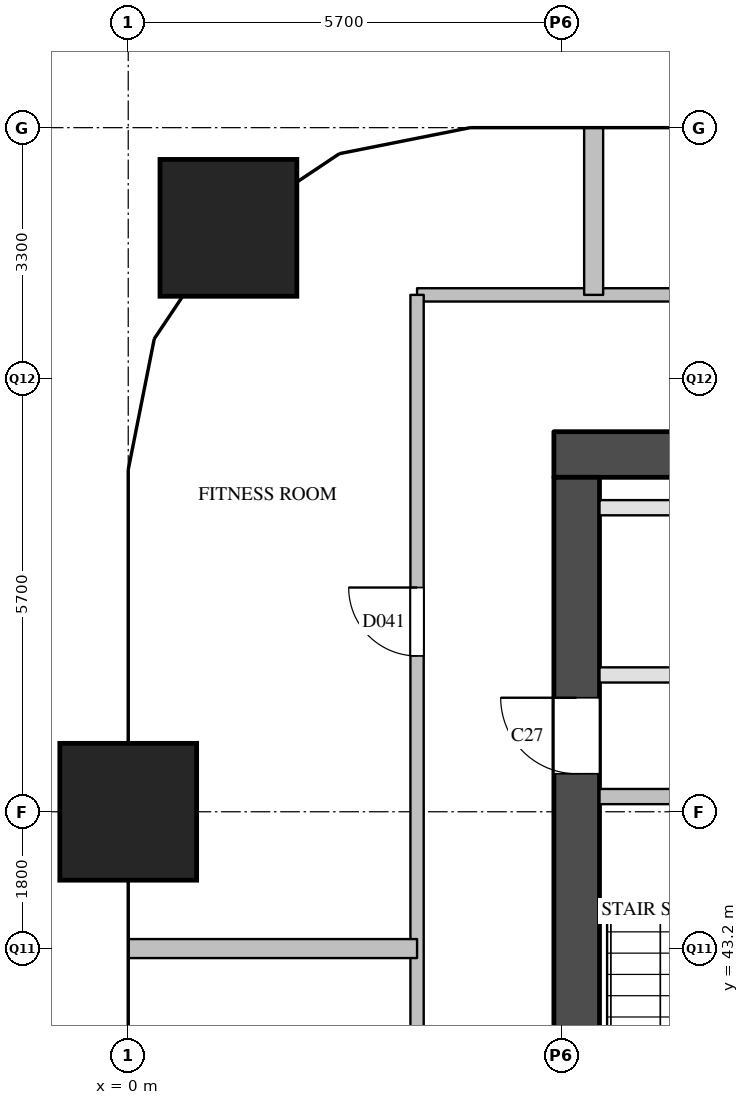
"""IFC4 building model, lengths in metres.
Left out: names, types, materials, properties, quantities, classifications, styles, units other than length and angle.
Written with IfcOpenShell. Run it as: python <this file> out.ifc"""

import sys

from ifc_helpers import new_model, si_unit, direction, frame, frame_2d, origin, origin_2d, place, context, subcontext, project, spatial, rectangle, extrude, element, fill, save


model = new_model("IFC4")
c1 = context("Model", 3, precision=1e-05, world=origin(), true_north=direction((0.0, 1.0)))
c2 = subcontext(c1, "Body", "Model", "MODEL_VIEW")
j1 = project(units=[si_unit("LENGTHUNIT", "METRE"), si_unit("PLANEANGLEUNIT", "RADIAN")], contexts=[c1])
p1 = place(None, origin())
s1 = spatial("IfcSite", under=j1, at=p1, CompositionType="ELEMENT")
p2 = place(p1, origin())
s2 = spatial("IfcBuilding", under=s1, at=p2, CompositionType="ELEMENT")
p3 = place(p2, frame((0.0, 0.0, 57.6)))
s3 = spatial("IfcBuildingStorey", under=s2, at=p3, CompositionType="ELEMENT", Elevation=57.6)
for number, where, z_axis, x_axis in (
    (1, (0.0, 45.0, 0.0), (0.0, 0.0, 1.0), (1.0, 0.0, 0.0)),
    (2, (1.318, 52.682, 0.0), (0.0, 0.0, 1.0), (1.0, 0.0, 0.0)),
):
    element("IfcColumn", number, at=place(p3, frame(where, z_axis=z_axis, x_axis=x_axis)), inside=s3, PredefinedType="COLUMN", context=c2, shape_type="SweptSolid", body=[
        extrude(rectangle(XDim=1.8, YDim=1.8, at=origin_2d()), origin(), (0.0, 0.0, 1.0), 3.8),
    ])
p4 = place(p3, frame((5.6, 49.7, 0.0), z_axis=(0.0, 0.0, 1.0), x_axis=(1.0, 0.0, 0.0)))
e3 = element("IfcWall", 3, at=p4, inside=s3, PredefinedType="SHEAR", context=c2, shape_type="SweptSolid", body=[
    extrude(rectangle(XDim=12.4, YDim=0.6, at=frame_2d((6.2, 0.0))), origin(), (0.0, 0.0, 1.0), 3.5),
])
p5 = place(p3, frame((5.9, 29.1, 0.0), z_axis=(0.0, 0.0, 1.0), x_axis=(0.0, 1.0, 0.0)))
e4 = element("IfcWall", 4, at=p5, inside=s3, PredefinedType="SHEAR", context=c2, shape_type="SweptSolid", body=[
    extrude(rectangle(XDim=20.3, YDim=0.6, at=frame_2d((10.15, 0.0))), origin(), (0.0, 0.0, 1.0), 3.5),
])
p6 = place(p5, frame((3.6, 0.0, 0.0)))
e5 = element("IfcOpeningElement", 5, at=p6, cuts=e4, PredefinedType="OPENING", context=c2, shape_type="SweptSolid", body=[
    extrude(rectangle(XDim=1.8, YDim=2.1, at=frame_2d((0.9, 1.05))), frame((0.0, 0.31, 0.0), z_axis=(0.0, -1.0, 0.0), x_axis=(1.0, 0.0, 0.0)), (0.0, 0.0, 1.0), 0.62),
])
p7 = place(p5, frame((16.4, 0.0, 0.0)))
e6 = element("IfcOpeningElement", 6, at=p7, cuts=e4, PredefinedType="OPENING", context=c2, shape_type="SweptSolid", body=[
    extrude(rectangle(XDim=1.0, YDim=2.1, at=frame_2d((0.5, 1.05))), frame((0.0, 0.31, 0.0), z_axis=(0.0, -1.0, 0.0), x_axis=(1.0, 0.0, 0.0)), (0.0, 0.0, 1.0), 0.62),
])
p8 = place(p3, frame((6.2, 45.2, 0.0), z_axis=(0.0, 0.0, 1.0), x_axis=(1.0, 0.0, 0.0)))
e7 = element("IfcWall", 7, at=p8, inside=s3, PredefinedType="SOLIDWALL", context=c2, shape_type="SweptSolid", body=[
    extrude(rectangle(XDim=6.3, YDim=0.2, at=frame_2d((3.15, 0.0))), origin(), (0.0, 0.0, 1.0), 3.5),
])
p9 = place(p8, frame((1.025, 0.0, 0.0)))
e8 = element("IfcOpeningElement", 8, at=p9, cuts=e7, PredefinedType="OPENING", context=c2, shape_type="SweptSolid", body=[
    extrude(rectangle(XDim=1.1, YDim=2.1, at=frame_2d((0.55, 1.05))), frame((0.0, 0.11, 0.0), z_axis=(0.0, -1.0, 0.0), x_axis=(1.0, 0.0, 0.0)), (0.0, 0.0, 1.0), 0.22),
])
p10 = place(p8, frame((4.175, 0.0, 0.0)))
e9 = element("IfcOpeningElement", 9, at=p10, cuts=e7, PredefinedType="OPENING", context=c2, shape_type="SweptSolid", body=[
    extrude(rectangle(XDim=1.1, YDim=2.1, at=frame_2d((0.55, 1.05))), frame((0.0, 0.11, 0.0), z_axis=(0.0, -1.0, 0.0), x_axis=(1.0, 0.0, 0.0)), (0.0, 0.0, 1.0), 0.22),
])
p11 = place(p3, frame((6.2, 46.8, 0.0), z_axis=(0.0, 0.0, 1.0), x_axis=(1.0, 0.0, 0.0)))
e10 = element("IfcWall", 10, at=p11, inside=s3, PredefinedType="PARTITIONING", context=c2, shape_type="SweptSolid", body=[
    extrude(rectangle(XDim=11.2, YDim=0.2, at=frame_2d((5.6, 0.0))), origin(), (0.0, 0.0, 1.0), 3.5),
])
p12 = place(p11, frame((5.15, 0.0, 0.0)))
e11 = element("IfcOpeningElement", 11, at=p12, cuts=e10, PredefinedType="OPENING", context=c2, shape_type="SweptSolid", body=[
    extrude(rectangle(XDim=0.9, YDim=2.1, at=frame_2d((0.45, 1.05))), frame((0.0, 0.11, 0.0), z_axis=(0.0, -1.0, 0.0), x_axis=(1.0, 0.0, 0.0)), (0.0, 0.0, 1.0), 0.22),
])
p13 = place(p3, frame((6.2, 49.0, 0.0), z_axis=(0.0, 0.0, 1.0), x_axis=(1.0, 0.0, 0.0)))
e12 = element("IfcWall", 12, at=p13, inside=s3, PredefinedType="PARTITIONING", context=c2, shape_type="SweptSolid", body=[
    extrude(rectangle(XDim=11.2, YDim=0.2, at=frame_2d((5.6, 0.0))), origin(), (0.0, 0.0, 1.0), 3.5),
])
p14 = place(p3, frame((3.8, 51.8, 0.0), z_axis=(0.0, 0.0, 1.0), x_axis=(1.0, 0.0, 0.0)))
e13 = element("IfcWall", 13, at=p14, inside=s3, PredefinedType="PARTITIONING", context=c2, shape_type="SweptSolid", body=[
    extrude(rectangle(XDim=16.0, YDim=0.175, at=frame_2d((8.0, 0.0))), origin(), (0.0, 0.0, 1.0), 3.5),
])
p15 = place(p14, frame((7.811, 0.0, 0.0)))
e14 = element("IfcOpeningElement", 14, at=p15, cuts=e13, PredefinedType="OPENING", context=c2, shape_type="SweptSolid", body=[
    extrude(rectangle(XDim=0.9, YDim=2.1, at=frame_2d((0.45, 1.05))), frame((0.0, 0.097, 0.0), z_axis=(0.0, -1.0, 0.0), x_axis=(1.0, 0.0, 0.0)), (0.0, 0.0, 1.0), 0.195),
])
p16 = place(p3, frame((3.8, 26.7, 0.0), z_axis=(0.0, 0.0, 1.0), x_axis=(0.0, 1.0, 0.0)))
e15 = element("IfcWall", 15, at=p16, inside=s3, PredefinedType="PARTITIONING", context=c2, shape_type="SweptSolid", body=[
    extrude(rectangle(XDim=25.1, YDim=0.175, at=frame_2d((12.55, 0.0))), origin(), (0.0, 0.0, 1.0), 2.5),
])
p17 = place(p16, frame((2.4, 0.0, 0.0)))
e16 = element("IfcOpeningElement", 16, at=p17, cuts=e15, PredefinedType="OPENING", context=c2, shape_type="SweptSolid", body=[
    extrude(rectangle(XDim=0.9, YDim=2.1, at=frame_2d((0.45, 1.05))), frame((0.0, 0.097, 0.0), z_axis=(0.0, -1.0, 0.0), x_axis=(1.0, 0.0, 0.0)), (0.0, 0.0, 1.0), 0.195),
])
p18 = place(p16, frame((7.05, 0.0, 0.0)))
e17 = element("IfcOpeningElement", 17, at=p18, cuts=e15, PredefinedType="OPENING", context=c2, shape_type="SweptSolid", body=[
    extrude(rectangle(XDim=0.9, YDim=2.1, at=frame_2d((0.45, 1.05))), frame((0.0, 0.097, 0.0), z_axis=(0.0, -1.0, 0.0), x_axis=(1.0, 0.0, 0.0)), (0.0, 0.0, 1.0), 0.195),
])
p19 = place(p16, frame((12.45, 0.0, 0.0)))
e18 = element("IfcOpeningElement", 18, at=p19, cuts=e15, PredefinedType="OPENING", context=c2, shape_type="SweptSolid", body=[
    extrude(rectangle(XDim=0.9, YDim=2.1, at=frame_2d((0.45, 1.05))), frame((0.0, 0.097, 0.0), z_axis=(0.0, -1.0, 0.0), x_axis=(1.0, 0.0, 0.0)), (0.0, 0.0, 1.0), 0.195),
])
p20 = place(p16, frame((20.35, 0.0, 0.0)))
e19 = element("IfcOpeningElement", 19, at=p20, cuts=e15, PredefinedType="OPENING", context=c2, shape_type="SweptSolid", body=[
    extrude(rectangle(XDim=0.9, YDim=2.1, at=frame_2d((0.45, 1.05))), frame((0.0, 0.097, 0.0), z_axis=(0.0, -1.0, 0.0), x_axis=(1.0, 0.0, 0.0)), (0.0, 0.0, 1.0), 0.195),
])
p21 = place(p3, frame((0.0, 43.2, 0.0), z_axis=(0.0, 0.0, 1.0), x_axis=(1.0, 0.0, 0.0)))
e20 = element("IfcWall", 20, at=p21, inside=s3, PredefinedType="PARTITIONING", context=c2, shape_type="SweptSolid", body=[
    extrude(rectangle(XDim=3.8, YDim=0.25, at=frame_2d((1.9, 0.0))), origin(), (0.0, 0.0, 1.0), 2.5),
])
p22 = place(p3, frame((6.123, 51.8, 0.0), z_axis=(0.0, 0.0, 1.0), x_axis=(0.0, 1.0, 0.0)))
e21 = element("IfcWall", 21, at=p22, inside=s3, PredefinedType="PARTITIONING", context=c2, shape_type="SweptSolid", body=[
    extrude(rectangle(XDim=2.2, YDim=0.25, at=frame_2d((1.1, 0.0))), origin(), (0.0, 0.0, 1.0), 2.5),
])
p23 = place(p7, origin())
e22 = element("IfcDoor", 22, at=p23, inside=s3, OperationType="SINGLE_SWING_RIGHT", PredefinedType="DOOR", context=c2, shape_type="SweptSolid", body=[
    extrude(rectangle(XDim=1.0, YDim=2.1, at=frame_2d((0.5, 1.05))), frame((0.0, 0.025, 0.0), z_axis=(0.0, -1.0, 0.0), x_axis=(1.0, 0.0, 0.0)), (0.0, 0.0, 1.0), 0.05),
])
fill(e6, e22)
p24 = place(p20, origin())
e23 = element("IfcDoor", 23, at=p24, inside=s3, OperationType="SINGLE_SWING_RIGHT", PredefinedType="DOOR", context=c2, shape_type="SweptSolid", body=[
    extrude(rectangle(XDim=0.9, YDim=2.1, at=frame_2d((0.45, 1.05))), frame((0.0, 0.025, 0.0), z_axis=(0.0, -1.0, 0.0), x_axis=(1.0, 0.0, 0.0)), (0.0, 0.0, 1.0), 0.05),
])
fill(e19, e23)
save(model, sys.argv[1])
